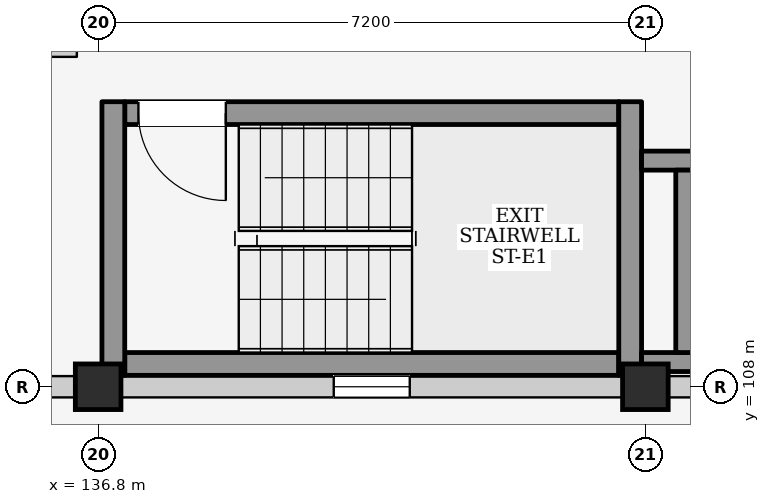
"""IFC4 building model, lengths in metres.
Left out: names, types, materials, properties, quantities, classifications, styles, units other than length and angle.
Written with IfcOpenShell. Run it as: python <this file> out.ifc"""

import sys

from ifc_helpers import new_model, si_unit, direction, frame, frame_2d, origin, origin_2d, place, context, subcontext, project, spatial, rectangle, extrude, element, fill, save


model = new_model("IFC4")
c1 = context("Model", 3, precision=1e-05, world=origin(), true_north=direction((0.0, 1.0)))
c2 = subcontext(c1, "Body", "Model", "MODEL_VIEW")
j1 = project(units=[si_unit("LENGTHUNIT", "METRE"), si_unit("PLANEANGLEUNIT", "RADIAN")], contexts=[c1])
p1 = place(None, origin())
s1 = spatial("IfcSite", under=j1, at=p1, CompositionType="ELEMENT")
p2 = place(p1, origin())
s2 = spatial("IfcBuilding", under=s1, at=p2, CompositionType="ELEMENT")
p3 = place(p2, frame((0.0, 0.0, 9.0)))
s3 = spatial("IfcBuildingStorey", under=s2, at=p3, CompositionType="ELEMENT", Elevation=9.0)
for number, where, z_axis, x_axis in (
    (1, (136.8, 108.0, 0.0), (0.0, 0.0, 1.0), (1.0, 0.0, 0.0)),
    (2, (144.0, 108.0, 0.0), (0.0, 0.0, 1.0), (1.0, 0.0, 0.0)),
):
    element("IfcColumn", number, at=place(p3, frame(where, z_axis=z_axis, x_axis=x_axis)), inside=s3, PredefinedType="COLUMN", context=c2, shape_type="SweptSolid", body=[
        extrude(rectangle(XDim=0.6, YDim=0.6, at=origin_2d()), origin(), (0.0, 0.0, 1.0), 3.2),
    ])
p4 = place(p3, frame((129.9, 108.0, 0.0), z_axis=(0.0, 0.0, 1.0), x_axis=(1.0, 0.0, 0.0)))
e3 = element("IfcWall", 3, at=p4, inside=s3, PredefinedType="ELEMENTEDWALL", context=c2, shape_type="SweptSolid", body=[
    extrude(rectangle(XDim=6.6, YDim=0.28, at=frame_2d((3.3, 0.0))), origin(), (0.0, 0.0, 1.0), 2.345),
])
p5 = place(p4, frame((1.1, 0.0, 0.0)))
e4 = element("IfcOpeningElement", 4, at=p5, cuts=e3, PredefinedType="OPENING", context=c2, shape_type="SweptSolid", body=[
    extrude(rectangle(XDim=1.5, YDim=2.12, at=frame_2d((0.75, 1.06))), frame((0.0, 0.155, 0.0), z_axis=(0.0, -1.0, 0.0), x_axis=(1.0, 0.0, 0.0)), (0.0, 0.0, 1.0), 0.31),
])
p6 = place(p4, frame((3.6, 0.0, 0.735)))
e5 = element("IfcOpeningElement", 5, at=p6, cuts=e3, PredefinedType="OPENING", context=c2, shape_type="SweptSolid", body=[
    extrude(rectangle(XDim=1.35, YDim=1.5, at=frame_2d((0.675, 0.75))), frame((0.0, 0.155, 0.0), z_axis=(0.0, -1.0, 0.0), x_axis=(1.0, 0.0, 0.0)), (0.0, 0.0, 1.0), 0.31),
])
p7 = place(p3, frame((137.1, 108.0, 0.0), z_axis=(0.0, 0.0, 1.0), x_axis=(1.0, 0.0, 0.0)))
e6 = element("IfcWall", 6, at=p7, inside=s3, PredefinedType="ELEMENTEDWALL", context=c2, shape_type="SweptSolid", body=[
    extrude(rectangle(XDim=6.6, YDim=0.28, at=frame_2d((3.3, 0.0))), origin(), (0.0, 0.0, 1.0), 2.345),
])
p8 = place(p7, frame((2.8, 0.0, 1.2)))
e7 = element("IfcOpeningElement", 7, at=p8, cuts=e6, PredefinedType="OPENING", context=c2, shape_type="SweptSolid", body=[
    extrude(rectangle(XDim=1.0, YDim=0.9, at=frame_2d((0.5, 0.45))), frame((0.0, 0.155, 0.0), z_axis=(0.0, -1.0, 0.0), x_axis=(1.0, 0.0, 0.0)), (0.0, 0.0, 1.0), 0.31),
])
p9 = place(p3, frame((144.3, 108.0, 0.0), z_axis=(0.0, 0.0, 1.0), x_axis=(1.0, 0.0, 0.0)))
e8 = element("IfcWall", 8, at=p9, inside=s3, PredefinedType="ELEMENTEDWALL", context=c2, shape_type="SweptSolid", body=[
    extrude(rectangle(XDim=6.6, YDim=0.28, at=frame_2d((3.3, 0.0))), origin(), (0.0, 0.0, 1.0), 2.345),
])
p10 = place(p9, frame((2.8, 0.0, 1.2)))
e9 = element("IfcOpeningElement", 9, at=p10, cuts=e8, PredefinedType="OPENING", context=c2, shape_type="SweptSolid", body=[
    extrude(rectangle(XDim=1.0, YDim=0.9, at=frame_2d((0.5, 0.45))), frame((0.0, 0.155, 0.0), z_axis=(0.0, -1.0, 0.0), x_axis=(1.0, 0.0, 0.0)), (0.0, 0.0, 1.0), 0.31),
])
p11 = place(p3, frame((137.15, 108.3, 0.0), z_axis=(0.0, 0.0, 1.0), x_axis=(1.0, 0.0, 0.0)))
e10 = element("IfcWall", 10, at=p11, inside=s3, PredefinedType="SHEAR", context=c2, shape_type="SweptSolid", body=[
    extrude(rectangle(XDim=6.5, YDim=0.3, at=frame_2d((3.25, 0.0))), origin(), (0.0, 0.0, 1.0), 2.96),
])
p12 = place(p3, frame((137.15, 111.6, 0.0), z_axis=(0.0, 0.0, 1.0), x_axis=(1.0, 0.0, 0.0)))
e11 = element("IfcWall", 11, at=p12, inside=s3, PredefinedType="SHEAR", context=c2, shape_type="SweptSolid", body=[
    extrude(rectangle(XDim=6.5, YDim=0.3, at=frame_2d((3.25, 0.0))), origin(), (0.0, 0.0, 1.0), 2.96),
])
p13 = place(p12, frame((0.18, 0.0, 0.0)))
e12 = element("IfcOpeningElement", 12, at=p13, cuts=e11, PredefinedType="OPENING", context=c2, shape_type="SweptSolid", body=[
    extrude(rectangle(XDim=1.15, YDim=2.2, at=frame_2d((0.575, 1.1))), frame((0.0, 0.165, 0.0), z_axis=(0.0, -1.0, 0.0), x_axis=(1.0, 0.0, 0.0)), (0.0, 0.0, 1.0), 0.33),
])
for number, where, z_axis, x_axis in (
    (13, (137.0, 108.15, 0.0), (0.0, 0.0, 1.0), (0.0, 1.0, 0.0)),
    (14, (143.8, 108.15, 0.0), (0.0, 0.0, 1.0), (0.0, 1.0, 0.0)),
):
    element("IfcWall", number, at=place(p3, frame(where, z_axis=z_axis, x_axis=x_axis)), inside=s3, PredefinedType="SHEAR", context=c2, shape_type="SweptSolid", body=[
        extrude(rectangle(XDim=3.6, YDim=0.3, at=frame_2d((1.8, 0.0))), origin(), (0.0, 0.0, 1.0), 2.96),
    ])
p14 = place(p3, frame((143.95, 108.325, 0.0), z_axis=(0.0, 0.0, 1.0), x_axis=(1.0, 0.0, 0.0)))
e15 = element("IfcWall", 15, at=p14, inside=s3, PredefinedType="SHEAR", context=c2, shape_type="SweptSolid", body=[
    extrude(rectangle(XDim=2.675, YDim=0.25, at=frame_2d((1.337, 0.0))), origin(), (0.0, 0.0, 1.0), 2.96),
])
p15 = place(p3, frame((143.95, 110.975, 0.0), z_axis=(0.0, 0.0, 1.0), x_axis=(1.0, 0.0, 0.0)))
e16 = element("IfcWall", 16, at=p15, inside=s3, PredefinedType="SHEAR", context=c2, shape_type="SweptSolid", body=[
    extrude(rectangle(XDim=2.675, YDim=0.25, at=frame_2d((1.337, 0.0))), origin(), (0.0, 0.0, 1.0), 2.96),
])
p16 = place(p15, frame((1.0, 0.0, 0.0)))
e17 = element("IfcOpeningElement", 17, at=p16, cuts=e16, PredefinedType="OPENING", context=c2, shape_type="SweptSolid", body=[
    extrude(rectangle(XDim=1.2, YDim=2.25, at=frame_2d((0.6, 1.125))), frame((0.0, 0.14, 0.0), z_axis=(0.0, -1.0, 0.0), x_axis=(1.0, 0.0, 0.0)), (0.0, 0.0, 1.0), 0.28),
])
p17 = place(p3, frame((144.525, 108.45, 0.0), z_axis=(0.0, 0.0, 1.0), x_axis=(0.0, 1.0, 0.0)))
e18 = element("IfcWall", 18, at=p17, inside=s3, PredefinedType="SHEAR", context=c2, shape_type="SweptSolid", body=[
    extrude(rectangle(XDim=2.4, YDim=0.25, at=frame_2d((1.2, 0.0))), origin(), (0.0, 0.0, 1.0), 2.96),
])
p18 = place(p3, frame((129.88, 112.42, 0.0), z_axis=(0.0, 0.0, 1.0), x_axis=(1.0, 0.0, 0.0)))
e19 = element("IfcWall", 19, at=p18, inside=s3, PredefinedType="PARTITIONING", context=c2, shape_type="SweptSolid", body=[
    extrude(rectangle(XDim=6.64, YDim=0.16, at=frame_2d((3.32, 0.0))), origin(), (0.0, 0.0, 1.0), 2.96),
])
p19 = place(p18, frame((2.78, 0.0, 0.0)))
e20 = element("IfcOpeningElement", 20, at=p19, cuts=e19, PredefinedType="OPENING", context=c2, shape_type="SweptSolid", body=[
    extrude(rectangle(XDim=1.08, YDim=2.22, at=frame_2d((0.54, 1.11))), frame((0.0, 0.095, 0.0), z_axis=(0.0, -1.0, 0.0), x_axis=(1.0, 0.0, 0.0)), (0.0, 0.0, 1.0), 0.19),
])
p20 = place(p8, origin())
e21 = element("IfcWindow", 21, at=p20, inside=s3, PartitioningType="SINGLE_PANEL", PredefinedType="WINDOW", context=c2, shape_type="SweptSolid", body=[
    extrude(rectangle(XDim=1.0, YDim=0.9, at=frame_2d((0.5, 0.45))), frame((0.0, 0.03, 0.0), z_axis=(0.0, -1.0, 0.0), x_axis=(1.0, 0.0, 0.0)), (0.0, 0.0, 1.0), 0.06),
])
fill(e7, e21)
p21 = place(p13, frame((1.15, 0.0, 0.0), z_axis=(0.0, 0.0, 1.0), x_axis=(-1.0, 0.0, 0.0)))
e22 = element("IfcDoor", 22, at=p21, inside=s3, OperationType="SINGLE_SWING_LEFT", PredefinedType="DOOR", context=c2, shape_type="SweptSolid", body=[
    extrude(rectangle(XDim=1.15, YDim=2.2, at=frame_2d((0.575, 1.1))), frame((0.0, 0.025, 0.0), z_axis=(0.0, -1.0, 0.0), x_axis=(1.0, 0.0, 0.0)), (0.0, 0.0, 1.0), 0.05),
])
fill(e12, e22)
save(model, sys.argv[1])
